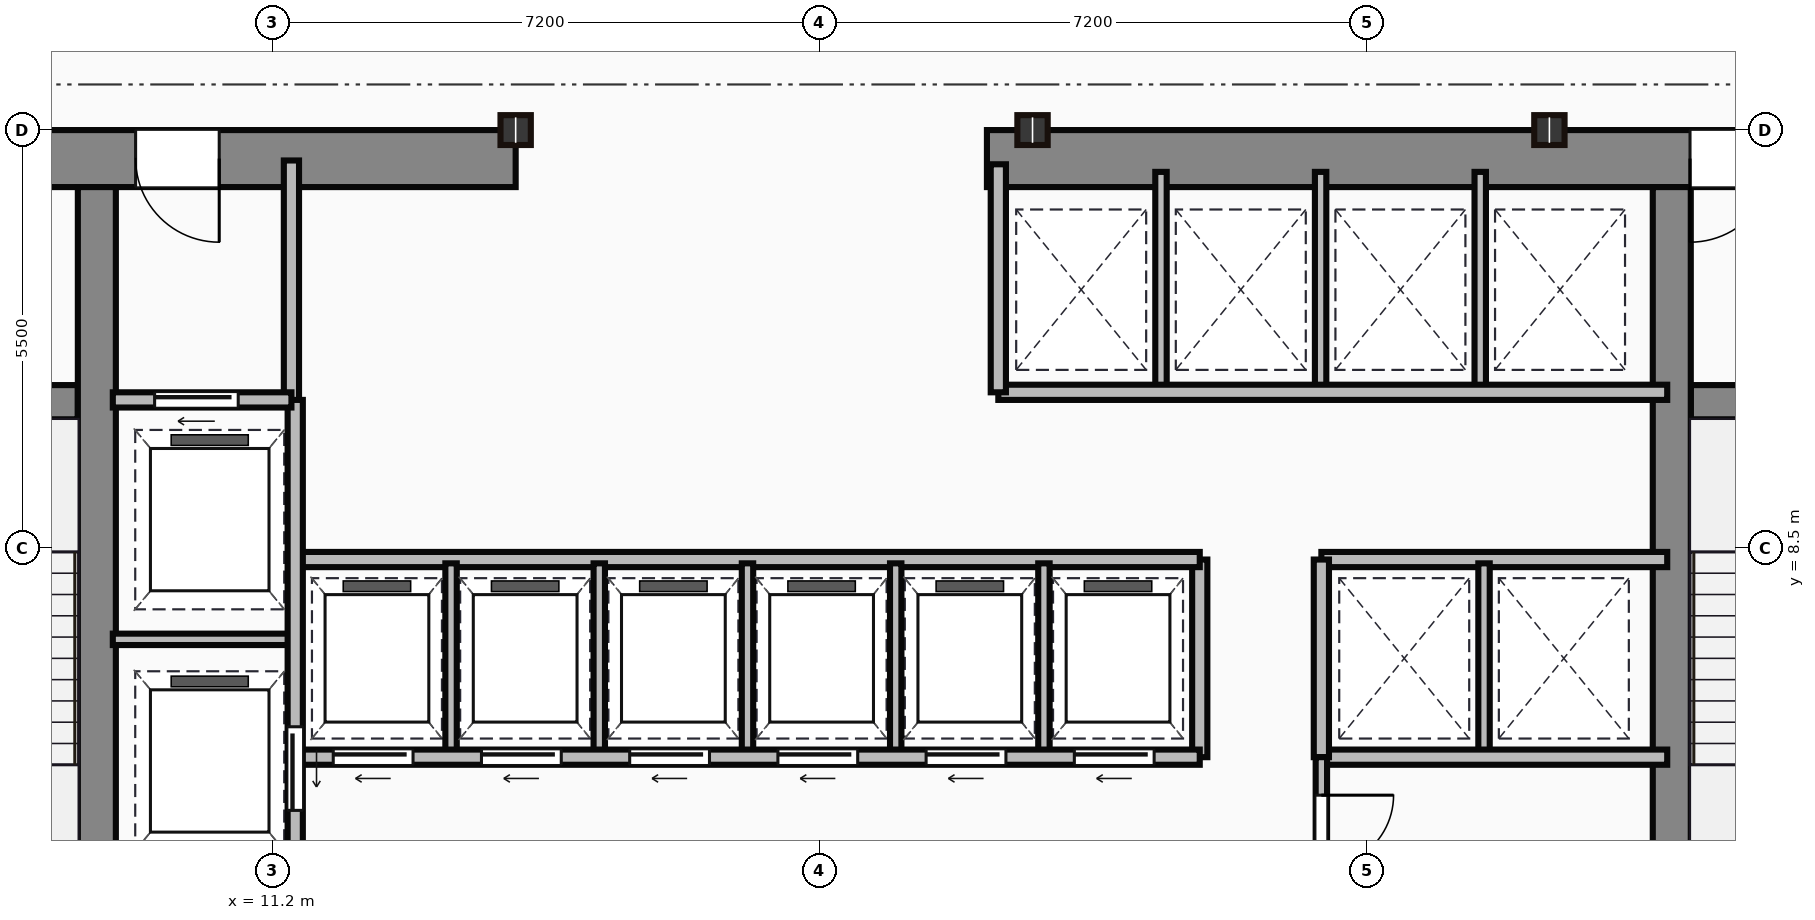
"""IFC4 building model, lengths in metres.
Left out: names, types, materials, properties, quantities, classifications, styles, units other than length and angle.
Written with IfcOpenShell. Run it as: python <this file> out.ifc"""

import sys

from ifc_helpers import new_model, si_unit, direction, frame, frame_2d, origin, origin_2d, place, context, subcontext, project, spatial, rectangle, i_section, extrude, source, transform, mapped, element, fill, save


model = new_model("IFC4")
c1 = context("Model", 3, precision=1e-05, world=origin(), true_north=direction((0.0, 1.0)))
c2 = subcontext(c1, "Body", "Model", "MODEL_VIEW")
j1 = project(units=[si_unit("LENGTHUNIT", "METRE"), si_unit("PLANEANGLEUNIT", "RADIAN")], contexts=[c1])
p1 = place(None, origin())
s1 = spatial("IfcSite", under=j1, at=p1, CompositionType="ELEMENT")
p2 = place(p1, origin())
s2 = spatial("IfcBuilding", under=s1, at=p2, CompositionType="ELEMENT")
p3 = place(p2, frame((0.0, 0.0, 110.55)))
s3 = spatial("IfcBuildingStorey", under=s2, at=p3, CompositionType="ELEMENT", Elevation=110.55)
m1 = source(origin(), c2, "Body", "SweptSolid", [
    extrude(rectangle(XDim=9.1, YDim=0.75, at=frame_2d((4.55, 0.0))), origin(), (0.0, 0.0, 1.0), 3.65),
])
p4 = place(p3, frame((5.3, 13.625, 0.0), z_axis=(0.0, 0.0, 1.0), x_axis=(1.0, 0.0, 0.0)))
e1 = element("IfcWall", 1, at=p4, inside=s3, PredefinedType="SHEAR", context=c2, shape_type="MappedRepresentation", body=[
    mapped(m1, transform((0.0, 0.0, 0.0))),
])
p5 = place(p4, frame((4.1, 0.0, 0.0)))
e2 = element("IfcOpeningElement", 2, at=p5, cuts=e1, PredefinedType="OPENING", context=c2, shape_type="SweptSolid", body=[
    extrude(rectangle(XDim=1.1, YDim=2.15, at=frame_2d((0.55, 1.075))), frame((0.0, 0.385, 0.0), z_axis=(0.0, -1.0, 0.0), x_axis=(1.0, 0.0, 0.0)), (0.0, 0.0, 1.0), 0.77),
])
m2 = source(origin(), c2, "Body", "SweptSolid", [
    extrude(rectangle(XDim=12.6, YDim=0.75, at=frame_2d((6.3, 0.0))), origin(), (0.0, 0.0, 1.0), 3.65),
])
p6 = place(p3, frame((20.6, 13.625, 0.0), z_axis=(0.0, 0.0, 1.0), x_axis=(1.0, 0.0, 0.0)))
e3 = element("IfcWall", 3, at=p6, inside=s3, PredefinedType="SHEAR", context=c2, shape_type="MappedRepresentation", body=[
    mapped(m2, transform((0.0, 0.0, 0.0))),
])
p7 = place(p6, frame((9.25, 0.0, 0.0)))
e4 = element("IfcOpeningElement", 4, at=p7, cuts=e3, PredefinedType="OPENING", context=c2, shape_type="SweptSolid", body=[
    extrude(rectangle(XDim=1.1, YDim=2.15, at=frame_2d((0.55, 1.075))), frame((0.0, 0.385, 0.0), z_axis=(0.0, -1.0, 0.0), x_axis=(1.0, 0.0, 0.0)), (0.0, 0.0, 1.0), 0.77),
])
m3 = source(origin(), c2, "Body", "SweptSolid", [
    extrude(rectangle(XDim=12.35, YDim=0.5, at=frame_2d((6.175, 0.0))), origin(), (0.0, 0.0, 1.0), 3.65),
])
for number, where, z_axis, x_axis in (
    (5, (8.89, 0.9, 0.0), (0.0, 0.0, 1.0), (0.0, 1.0, 0.0)),
    (6, (29.61, 0.9, 0.0), (0.0, 0.0, 1.0), (0.0, 1.0, 0.0)),
):
    element("IfcWall", number, at=place(p3, frame(where, z_axis=z_axis, x_axis=x_axis)), inside=s3, PredefinedType="SHEAR", context=c2, shape_type="MappedRepresentation", body=[
        mapped(m3, transform((0.0, 0.0, 0.0))),
    ])
m4 = source(origin(), c2, "Body", "SweptSolid", [
    extrude(rectangle(XDim=3.39, YDim=0.45, at=frame_2d((1.695, 0.0))), origin(), (0.0, 0.0, 1.0), 3.65),
])
p8 = place(p3, frame((5.25, 10.42, 0.0), z_axis=(0.0, 0.0, 1.0), x_axis=(1.0, 0.0, 0.0)))
e7 = element("IfcWall", 7, at=p8, inside=s3, PredefinedType="SHEAR", context=c2, shape_type="MappedRepresentation", body=[
    mapped(m4, transform((0.0, 0.0, 0.0))),
])
p9 = place(p8, frame((1.05, 0.0, 0.0)))
e8 = element("IfcOpeningElement", 8, at=p9, cuts=e7, PredefinedType="OPENING", context=c2, shape_type="SweptSolid", body=[
    extrude(rectangle(XDim=1.1, YDim=2.15, at=frame_2d((0.55, 1.075))), frame((0.0, 0.235, 0.0), z_axis=(0.0, -1.0, 0.0), x_axis=(1.0, 0.0, 0.0)), (0.0, 0.0, 1.0), 0.47),
])
p10 = place(p3, frame((29.86, 10.42, 0.0), z_axis=(0.0, 0.0, 1.0), x_axis=(1.0, 0.0, 0.0)))
e9 = element("IfcWall", 9, at=p10, inside=s3, PredefinedType="SHEAR", context=c2, shape_type="MappedRepresentation", body=[
    mapped(m4, transform((0.0, 0.0, 0.0))),
])
p11 = place(p10, frame((1.1, 0.0, 0.0)))
e10 = element("IfcOpeningElement", 10, at=p11, cuts=e9, PredefinedType="OPENING", context=c2, shape_type="SweptSolid", body=[
    extrude(rectangle(XDim=1.1, YDim=2.15, at=frame_2d((0.55, 1.075))), frame((0.0, 0.235, 0.0), z_axis=(0.0, -1.0, 0.0), x_axis=(1.0, 0.0, 0.0)), (0.0, 0.0, 1.0), 0.47),
])
m5 = source(origin(), c2, "Body", "SweptSolid", [
    extrude(i_section(OverallWidth=0.399, OverallDepth=0.393, WebThickness=0.023, FlangeThickness=0.037, at=origin_2d()), origin(), (0.0, 0.0, 1.0), 3.65),
])
for number, where, z_axis, x_axis in (
    (11, (14.4, 14.0, 0.0), (0.0, 0.0, 1.0), (1.0, 0.0, 0.0)),
    (12, (21.2, 14.0, 0.0), (0.0, 0.0, 1.0), (1.0, 0.0, 0.0)),
    (13, (28.0, 14.0, 0.0), (0.0, 0.0, 1.0), (1.0, 0.0, 0.0)),
):
    element("IfcColumn", number, at=place(p3, frame(where, z_axis=z_axis, x_axis=x_axis)), inside=s3, PredefinedType="COLUMN", context=c2, shape_type="MappedRepresentation", body=[
        mapped(m5, transform((0.0, 0.0, 0.0))),
    ])
m6 = source(origin(), c2, "Body", "SweptSolid", [
    extrude(rectangle(XDim=3.18, YDim=0.2, at=frame_2d((1.59, 0.0))), origin(), (0.0, 0.0, 1.0), 3.4),
])
p12 = place(p3, frame((11.45, 10.42, 0.0), z_axis=(0.0, 0.0, 1.0), x_axis=(0.0, 1.0, 0.0)))
e14 = element("IfcWall", 14, at=p12, inside=s3, PredefinedType="PARTITIONING", context=c2, shape_type="MappedRepresentation", body=[
    mapped(m6, transform((0.0, 0.0, 0.0))),
])
m7 = source(origin(), c2, "Body", "SweptSolid", [
    extrude(rectangle(XDim=2.35, YDim=0.2, at=frame_2d((1.175, 0.0))), origin(), (0.0, 0.0, 1.0), 3.4),
])
p13 = place(p3, frame((9.1, 10.45, 0.0), z_axis=(0.0, 0.0, 1.0), x_axis=(1.0, 0.0, 0.0)))
e15 = element("IfcWall", 15, at=p13, inside=s3, PredefinedType="PARTITIONING", context=c2, shape_type="MappedRepresentation", body=[
    mapped(m7, transform((0.0, 0.0, 0.0))),
])
p14 = place(p13, frame((0.55, 0.0, 0.0)))
e16 = element("IfcOpeningElement", 16, at=p14, cuts=e15, PredefinedType="OPENING", context=c2, shape_type="SweptSolid", body=[
    extrude(rectangle(XDim=1.1, YDim=2.15, at=frame_2d((0.55, 1.075))), frame((0.0, 0.11, 0.0), z_axis=(0.0, -1.0, 0.0), x_axis=(1.0, 0.0, 0.0)), (0.0, 0.0, 1.0), 0.22),
])
m8 = source(origin(), c2, "Body", "SweptSolid", [
    extrude(rectangle(XDim=9.6, YDim=0.2, at=frame_2d((4.8, 0.0))), origin(), (0.0, 0.0, 1.0), 3.4),
])
p15 = place(p3, frame((11.5, 0.85, 0.0), z_axis=(0.0, 0.0, 1.0), x_axis=(0.0, 1.0, 0.0)))
e17 = element("IfcWall", 17, at=p15, inside=s3, PredefinedType="PARTITIONING", context=c2, shape_type="MappedRepresentation", body=[
    mapped(m8, transform((0.0, 0.0, 0.0))),
])
p16 = place(p15, frame((4.2, 0.0, 0.0)))
e18 = element("IfcOpeningElement", 18, at=p16, cuts=e17, PredefinedType="OPENING", context=c2, shape_type="SweptSolid", body=[
    extrude(rectangle(XDim=1.1, YDim=2.15, at=frame_2d((0.55, 1.075))), frame((0.0, 0.11, 0.0), z_axis=(0.0, -1.0, 0.0), x_axis=(1.0, 0.0, 0.0)), (0.0, 0.0, 1.0), 0.22),
])
p17 = place(p15, frame((0.9, 0.0, 0.0)))
e19 = element("IfcOpeningElement", 19, at=p17, cuts=e17, PredefinedType="OPENING", context=c2, shape_type="SweptSolid", body=[
    extrude(rectangle(XDim=1.2, YDim=2.15, at=frame_2d((0.6, 1.075))), frame((0.0, 0.11, 0.0), z_axis=(0.0, -1.0, 0.0), x_axis=(1.0, 0.0, 0.0)), (0.0, 0.0, 1.0), 0.22),
])
m9 = source(origin(), c2, "Body", "SweptSolid", [
    extrude(rectangle(XDim=2.4, YDim=0.15, at=frame_2d((1.2, 0.0))), origin(), (0.0, 0.0, 1.0), 3.4),
])
p18 = place(p3, frame((9.1, 7.3, 0.0), z_axis=(0.0, 0.0, 1.0), x_axis=(1.0, 0.0, 0.0)))
e20 = element("IfcWall", 20, at=p18, inside=s3, PredefinedType="PARTITIONING", context=c2, shape_type="MappedRepresentation", body=[
    mapped(m9, transform((0.0, 0.0, 0.0))),
])
m10 = source(origin(), c2, "Body", "SweptSolid", [
    extrude(rectangle(XDim=11.85, YDim=0.2, at=frame_2d((5.925, 0.0))), origin(), (0.0, 0.0, 1.0), 3.4),
])
p19 = place(p3, frame((11.55, 5.75, 0.0), z_axis=(0.0, 0.0, 1.0), x_axis=(1.0, 0.0, 0.0)))
e21 = element("IfcWall", 21, at=p19, inside=s3, PredefinedType="PARTITIONING", context=c2, shape_type="MappedRepresentation", body=[
    mapped(m10, transform((0.0, 0.0, 0.0))),
])
p20 = place(p19, frame((0.45, 0.0, 0.0)))
e22 = element("IfcOpeningElement", 22, at=p20, cuts=e21, PredefinedType="OPENING", context=c2, shape_type="SweptSolid", body=[
    extrude(rectangle(XDim=1.05, YDim=2.15, at=frame_2d((0.525, 1.075))), frame((0.0, 0.11, 0.0), z_axis=(0.0, -1.0, 0.0), x_axis=(1.0, 0.0, 0.0)), (0.0, 0.0, 1.0), 0.22),
])
p21 = place(p19, frame((2.4, 0.0, 0.0)))
e23 = element("IfcOpeningElement", 23, at=p21, cuts=e21, PredefinedType="OPENING", context=c2, shape_type="SweptSolid", body=[
    extrude(rectangle(XDim=1.05, YDim=2.15, at=frame_2d((0.525, 1.075))), frame((0.0, 0.11, 0.0), z_axis=(0.0, -1.0, 0.0), x_axis=(1.0, 0.0, 0.0)), (0.0, 0.0, 1.0), 0.22),
])
p22 = place(p19, frame((4.35, 0.0, 0.0)))
e24 = element("IfcOpeningElement", 24, at=p22, cuts=e21, PredefinedType="OPENING", context=c2, shape_type="SweptSolid", body=[
    extrude(rectangle(XDim=1.05, YDim=2.15, at=frame_2d((0.525, 1.075))), frame((0.0, 0.11, 0.0), z_axis=(0.0, -1.0, 0.0), x_axis=(1.0, 0.0, 0.0)), (0.0, 0.0, 1.0), 0.22),
])
p23 = place(p19, frame((6.3, 0.0, 0.0)))
e25 = element("IfcOpeningElement", 25, at=p23, cuts=e21, PredefinedType="OPENING", context=c2, shape_type="SweptSolid", body=[
    extrude(rectangle(XDim=1.05, YDim=2.15, at=frame_2d((0.525, 1.075))), frame((0.0, 0.11, 0.0), z_axis=(0.0, -1.0, 0.0), x_axis=(1.0, 0.0, 0.0)), (0.0, 0.0, 1.0), 0.22),
])
p24 = place(p19, frame((8.25, 0.0, 0.0)))
e26 = element("IfcOpeningElement", 26, at=p24, cuts=e21, PredefinedType="OPENING", context=c2, shape_type="SweptSolid", body=[
    extrude(rectangle(XDim=1.05, YDim=2.15, at=frame_2d((0.525, 1.075))), frame((0.0, 0.11, 0.0), z_axis=(0.0, -1.0, 0.0), x_axis=(1.0, 0.0, 0.0)), (0.0, 0.0, 1.0), 0.22),
])
p25 = place(p19, frame((10.2, 0.0, 0.0)))
e27 = element("IfcOpeningElement", 27, at=p25, cuts=e21, PredefinedType="OPENING", context=c2, shape_type="SweptSolid", body=[
    extrude(rectangle(XDim=1.05, YDim=2.15, at=frame_2d((0.525, 1.075))), frame((0.0, 0.11, 0.0), z_axis=(0.0, -1.0, 0.0), x_axis=(1.0, 0.0, 0.0)), (0.0, 0.0, 1.0), 0.22),
])
p26 = place(p3, frame((11.55, 8.35, 0.0), z_axis=(0.0, 0.0, 1.0), x_axis=(1.0, 0.0, 0.0)))
e28 = element("IfcWall", 28, at=p26, inside=s3, PredefinedType="PARTITIONING", context=c2, shape_type="MappedRepresentation", body=[
    mapped(m10, transform((0.0, 0.0, 0.0))),
])
m11 = source(origin(), c2, "Body", "SweptSolid", [
    extrude(rectangle(XDim=2.6, YDim=0.2, at=frame_2d((1.3, 0.0))), origin(), (0.0, 0.0, 1.0), 3.4),
])
p27 = place(p3, frame((23.4, 5.75, 0.0), z_axis=(0.0, 0.0, 1.0), x_axis=(0.0, 1.0, 0.0)))
e29 = element("IfcWall", 29, at=p27, inside=s3, PredefinedType="PARTITIONING", context=c2, shape_type="MappedRepresentation", body=[
    mapped(m11, transform((0.0, 0.0, 0.0))),
])
m12 = source(origin(), c2, "Body", "SweptSolid", [
    extrude(rectangle(XDim=2.5, YDim=0.15, at=frame_2d((1.25, 0.0))), origin(), (0.0, 0.0, 1.0), 3.4),
])
for number, where, z_axis, x_axis in (
    (30, (13.55, 5.8, 0.0), (0.0, 0.0, 1.0), (0.0, 1.0, 0.0)),
    (31, (15.5, 5.8, 0.0), (0.0, 0.0, 1.0), (0.0, 1.0, 0.0)),
    (32, (17.45, 5.8, 0.0), (0.0, 0.0, 1.0), (0.0, 1.0, 0.0)),
    (33, (19.4, 5.8, 0.0), (0.0, 0.0, 1.0), (0.0, 1.0, 0.0)),
    (34, (21.35, 5.8, 0.0), (0.0, 0.0, 1.0), (0.0, 1.0, 0.0)),
):
    element("IfcWall", number, at=place(p3, frame(where, z_axis=z_axis, x_axis=x_axis)), inside=s3, PredefinedType="PARTITIONING", context=c2, shape_type="MappedRepresentation", body=[
        mapped(m12, transform((0.0, 0.0, 0.0))),
    ])
m13 = source(origin(), c2, "Body", "SweptSolid", [
    extrude(rectangle(XDim=8.8, YDim=0.2, at=frame_2d((4.4, 0.0))), origin(), (0.0, 0.0, 1.0), 3.4),
])
p28 = place(p3, frame((20.75, 10.55, 0.0), z_axis=(0.0, 0.0, 1.0), x_axis=(1.0, 0.0, 0.0)))
e35 = element("IfcWall", 35, at=p28, inside=s3, PredefinedType="PARTITIONING", context=c2, shape_type="MappedRepresentation", body=[
    mapped(m13, transform((0.0, 0.0, 0.0))),
])
m14 = source(origin(), c2, "Body", "SweptSolid", [
    extrude(rectangle(XDim=3.0, YDim=0.2, at=frame_2d((1.5, 0.0))), origin(), (0.0, 0.0, 1.0), 3.4),
])
p29 = place(p3, frame((20.75, 10.55, 0.0), z_axis=(0.0, 0.0, 1.0), x_axis=(0.0, 1.0, 0.0)))
e36 = element("IfcWall", 36, at=p29, inside=s3, PredefinedType="PARTITIONING", context=c2, shape_type="MappedRepresentation", body=[
    mapped(m14, transform((0.0, 0.0, 0.0))),
])
m15 = source(origin(), c2, "Body", "SweptSolid", [
    extrude(rectangle(XDim=2.85, YDim=0.15, at=frame_2d((1.425, 0.0))), origin(), (0.0, 0.0, 1.0), 3.4),
])
for number, where, z_axis, x_axis in (
    (37, (22.89, 10.6, 0.0), (0.0, 0.0, 1.0), (0.0, 1.0, 0.0)),
    (38, (24.99, 10.6, 0.0), (0.0, 0.0, 1.0), (0.0, 1.0, 0.0)),
    (39, (27.09, 10.6, 0.0), (0.0, 0.0, 1.0), (0.0, 1.0, 0.0)),
):
    element("IfcWall", number, at=place(p3, frame(where, z_axis=z_axis, x_axis=x_axis)), inside=s3, PredefinedType="PARTITIONING", context=c2, shape_type="MappedRepresentation", body=[
        mapped(m15, transform((0.0, 0.0, 0.0))),
    ])
m16 = source(origin(), c2, "Body", "SweptSolid", [
    extrude(rectangle(XDim=4.55, YDim=0.2, at=frame_2d((2.275, 0.0))), origin(), (0.0, 0.0, 1.0), 3.4),
])
for number, where, z_axis, x_axis in (
    (40, (25.0, 8.35, 0.0), (0.0, 0.0, 1.0), (1.0, 0.0, 0.0)),
    (41, (25.0, 5.75, 0.0), (0.0, 0.0, 1.0), (1.0, 0.0, 0.0)),
):
    element("IfcWall", number, at=place(p3, frame(where, z_axis=z_axis, x_axis=x_axis)), inside=s3, PredefinedType="PARTITIONING", context=c2, shape_type="MappedRepresentation", body=[
        mapped(m16, transform((0.0, 0.0, 0.0))),
    ])
p30 = place(p3, frame((25.0, 5.75, 0.0), z_axis=(0.0, 0.0, 1.0), x_axis=(0.0, 1.0, 0.0)))
e42 = element("IfcWall", 42, at=p30, inside=s3, PredefinedType="PARTITIONING", context=c2, shape_type="MappedRepresentation", body=[
    mapped(m11, transform((0.0, 0.0, 0.0))),
])
p31 = place(p3, frame((27.14, 5.8, 0.0), z_axis=(0.0, 0.0, 1.0), x_axis=(0.0, 1.0, 0.0)))
e43 = element("IfcWall", 43, at=p31, inside=s3, PredefinedType="PARTITIONING", context=c2, shape_type="MappedRepresentation", body=[
    mapped(m12, transform((0.0, 0.0, 0.0))),
])
m17 = source(origin(), c2, "Body", "SweptSolid", [
    extrude(rectangle(XDim=4.9, YDim=0.15, at=frame_2d((2.45, 0.0))), origin(), (0.0, 0.0, 1.0), 3.4),
])
p32 = place(p3, frame((25.0, 0.85, 0.0), z_axis=(0.0, 0.0, 1.0), x_axis=(0.0, 1.0, 0.0)))
e44 = element("IfcWall", 44, at=p32, inside=s3, PredefinedType="PARTITIONING", context=c2, shape_type="MappedRepresentation", body=[
    mapped(m17, transform((0.0, 0.0, 0.0))),
])
p33 = place(p32, frame((1.8, 0.0, 0.0)))
e45 = element("IfcOpeningElement", 45, at=p33, cuts=e44, PredefinedType="OPENING", context=c2, shape_type="SweptSolid", body=[
    extrude(rectangle(XDim=0.95, YDim=2.15, at=frame_2d((0.475, 1.075))), frame((0.0, 0.085, 0.0), z_axis=(0.0, -1.0, 0.0), x_axis=(1.0, 0.0, 0.0)), (0.0, 0.0, 1.0), 0.17),
])
p34 = place(p32, frame((3.45, 0.0, 0.0)))
e46 = element("IfcOpeningElement", 46, at=p34, cuts=e44, PredefinedType="OPENING", context=c2, shape_type="SweptSolid", body=[
    extrude(rectangle(XDim=0.95, YDim=2.15, at=frame_2d((0.475, 1.075))), frame((0.0, 0.085, 0.0), z_axis=(0.0, -1.0, 0.0), x_axis=(1.0, 0.0, 0.0)), (0.0, 0.0, 1.0), 0.17),
])
m18 = source(origin(), c2, "Body", "SweptSolid", [
    extrude(rectangle(XDim=1.1, YDim=2.15, at=frame_2d((0.55, 1.075))), frame((0.0, 0.025, 0.0), z_axis=(0.0, -1.0, 0.0), x_axis=(1.0, 0.0, 0.0)), (0.0, 0.0, 1.0), 0.05),
])
p35 = place(p5, origin())
e47 = element("IfcDoor", 47, at=p35, inside=s3, OperationType="SINGLE_SWING_RIGHT", PredefinedType="DOOR", context=c2, shape_type="MappedRepresentation", body=[
    mapped(m18, transform((0.0, 0.0, 0.0))),
])
fill(e2, e47)
p36 = place(p7, origin())
e48 = element("IfcDoor", 48, at=p36, inside=s3, OperationType="SINGLE_SWING_LEFT", PredefinedType="DOOR", context=c2, shape_type="MappedRepresentation", body=[
    mapped(m18, transform((0.0, 0.0, 0.0))),
])
fill(e4, e48)
p37 = place(p14, origin())
e49 = element("IfcDoor", 49, at=p37, inside=s3, OperationType="SLIDING_TO_LEFT", PredefinedType="DOOR", context=c2, shape_type="MappedRepresentation", body=[
    mapped(m18, transform((0.0, 0.0, 0.0))),
])
fill(e16, e49)
p38 = place(p16, frame((1.1, 0.0, 0.0), z_axis=(0.0, 0.0, 1.0), x_axis=(-1.0, 0.0, 0.0)))
e50 = element("IfcDoor", 50, at=p38, inside=s3, OperationType="SLIDING_TO_LEFT", PredefinedType="DOOR", context=c2, shape_type="MappedRepresentation", body=[
    mapped(m18, transform((0.0, 0.0, 0.0))),
])
fill(e18, e50)
m19 = source(origin(), c2, "Body", "SweptSolid", [
    extrude(rectangle(XDim=1.05, YDim=2.15, at=frame_2d((0.525, 1.075))), frame((0.0, 0.025, 0.0), z_axis=(0.0, -1.0, 0.0), x_axis=(1.0, 0.0, 0.0)), (0.0, 0.0, 1.0), 0.05),
])
p39 = place(p20, frame((1.05, 0.0, 0.0), z_axis=(0.0, 0.0, 1.0), x_axis=(-1.0, 0.0, 0.0)))
e51 = element("IfcDoor", 51, at=p39, inside=s3, OperationType="SLIDING_TO_LEFT", PredefinedType="DOOR", context=c2, shape_type="MappedRepresentation", body=[
    mapped(m19, transform((0.0, 0.0, 0.0))),
])
fill(e22, e51)
p40 = place(p21, frame((1.05, 0.0, 0.0), z_axis=(0.0, 0.0, 1.0), x_axis=(-1.0, 0.0, 0.0)))
e52 = element("IfcDoor", 52, at=p40, inside=s3, OperationType="SLIDING_TO_LEFT", PredefinedType="DOOR", context=c2, shape_type="MappedRepresentation", body=[
    mapped(m19, transform((0.0, 0.0, 0.0))),
])
fill(e23, e52)
p41 = place(p22, frame((1.05, 0.0, 0.0), z_axis=(0.0, 0.0, 1.0), x_axis=(-1.0, 0.0, 0.0)))
e53 = element("IfcDoor", 53, at=p41, inside=s3, OperationType="SLIDING_TO_LEFT", PredefinedType="DOOR", context=c2, shape_type="MappedRepresentation", body=[
    mapped(m19, transform((0.0, 0.0, 0.0))),
])
fill(e24, e53)
p42 = place(p23, frame((1.05, 0.0, 0.0), z_axis=(0.0, 0.0, 1.0), x_axis=(-1.0, 0.0, 0.0)))
e54 = element("IfcDoor", 54, at=p42, inside=s3, OperationType="SLIDING_TO_LEFT", PredefinedType="DOOR", context=c2, shape_type="MappedRepresentation", body=[
    mapped(m19, transform((0.0, 0.0, 0.0))),
])
fill(e25, e54)
p43 = place(p24, frame((1.05, 0.0, 0.0), z_axis=(0.0, 0.0, 1.0), x_axis=(-1.0, 0.0, 0.0)))
e55 = element("IfcDoor", 55, at=p43, inside=s3, OperationType="SLIDING_TO_LEFT", PredefinedType="DOOR", context=c2, shape_type="MappedRepresentation", body=[
    mapped(m19, transform((0.0, 0.0, 0.0))),
])
fill(e26, e55)
p44 = place(p25, frame((1.05, 0.0, 0.0), z_axis=(0.0, 0.0, 1.0), x_axis=(-1.0, 0.0, 0.0)))
e56 = element("IfcDoor", 56, at=p44, inside=s3, OperationType="SLIDING_TO_LEFT", PredefinedType="DOOR", context=c2, shape_type="MappedRepresentation", body=[
    mapped(m19, transform((0.0, 0.0, 0.0))),
])
fill(e27, e56)
m20 = source(origin(), c2, "Body", "SweptSolid", [
    extrude(rectangle(XDim=0.95, YDim=2.15, at=frame_2d((0.475, 1.075))), frame((0.0, 0.025, 0.0), z_axis=(0.0, -1.0, 0.0), x_axis=(1.0, 0.0, 0.0)), (0.0, 0.0, 1.0), 0.05),
])
p45 = place(p34, origin())
e57 = element("IfcDoor", 57, at=p45, inside=s3, OperationType="SINGLE_SWING_RIGHT", PredefinedType="DOOR", context=c2, shape_type="MappedRepresentation", body=[
    mapped(m20, transform((0.0, 0.0, 0.0))),
])
fill(e46, e57)
save(model, sys.argv[1])
